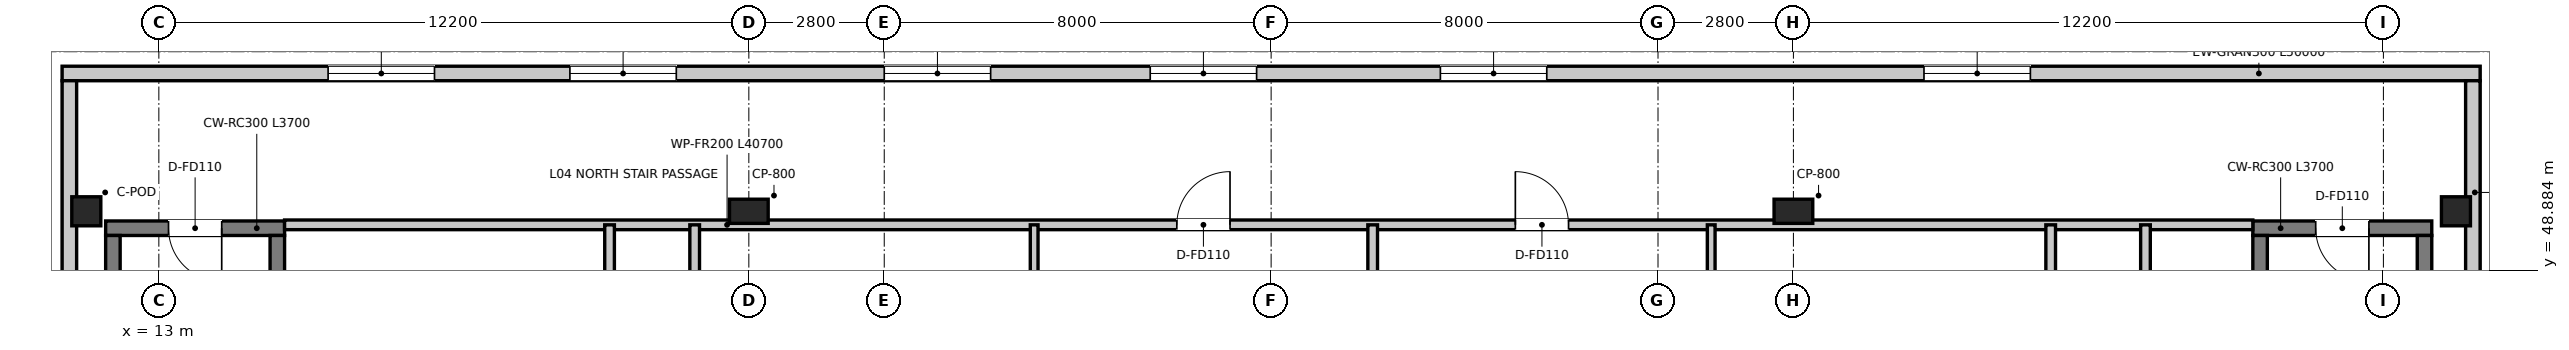
"""IFC4 building model, lengths in metres.
Left out: names, types, materials, properties, quantities, classifications, styles, units other than length and angle.
Written with IfcOpenShell. Run it as: python <this file> out.ifc"""

import sys

from ifc_helpers import new_model, si_unit, direction, frame, frame_2d, origin, origin_2d, place, context, subcontext, project, spatial, rectangle, extrude, source, transform, mapped, element, fill, save


model = new_model("IFC4")
c1 = context("Model", 3, precision=1e-05, world=origin(), true_north=direction((0.0, 1.0)))
c2 = subcontext(c1, "Body", "Model", "MODEL_VIEW")
j1 = project(units=[si_unit("LENGTHUNIT", "METRE"), si_unit("PLANEANGLEUNIT", "RADIAN")], contexts=[c1])
p1 = place(None, origin())
s1 = spatial("IfcSite", under=j1, at=p1, CompositionType="ELEMENT")
p2 = place(p1, origin())
s2 = spatial("IfcBuilding", under=s1, at=p2, CompositionType="ELEMENT")
p3 = place(p2, frame((0.0, 0.0, 20.0)))
s3 = spatial("IfcBuildingStorey", under=s2, at=p3, CompositionType="ELEMENT", Elevation=20.0)
p4 = place(p3, frame((15.6, 49.75, 0.0), z_axis=(0.0, 0.0, 1.0), x_axis=(-1.0, 0.0, 0.0)))
e1 = element("IfcWall", 1, at=p4, inside=s3, PredefinedType="SHEAR", context=c2, shape_type="SweptSolid", body=[
    extrude(rectangle(XDim=3.7, YDim=0.3, at=frame_2d((1.85, 0.0))), origin(), (0.0, 0.0, 1.0), 5.0),
])
p5 = place(p4, frame((1.3, 0.0, 0.0)))
e2 = element("IfcOpeningElement", 2, at=p5, cuts=e1, PredefinedType="OPENING", context=c2, shape_type="SweptSolid", body=[
    extrude(rectangle(XDim=1.1, YDim=2.15, at=frame_2d((0.55, 1.075))), frame((0.0, 0.16, 0.0), z_axis=(0.0, -1.0, 0.0), x_axis=(1.0, 0.0, 0.0)), (0.0, 0.0, 1.0), 0.32),
])
for number, where, z_axis, x_axis in (
    (3, (12.05, 42.12, 0.0), (0.0, 0.0, 1.0), (0.0, 1.0, 0.0)),
    (4, (15.45, 42.12, 0.0), (0.0, 0.0, 1.0), (0.0, 1.0, 0.0)),
):
    element("IfcWall", number, at=place(p3, frame(where, z_axis=z_axis, x_axis=x_axis)), inside=s3, PredefinedType="SHEAR", context=c2, shape_type="SweptSolid", body=[
        extrude(rectangle(XDim=7.48, YDim=0.3, at=frame_2d((3.74, 0.0))), origin(), (0.0, 0.0, 1.0), 5.0),
    ])
p6 = place(p3, frame((60.0, 49.75, 0.0), z_axis=(0.0, 0.0, 1.0), x_axis=(-1.0, 0.0, 0.0)))
e5 = element("IfcWall", 5, at=p6, inside=s3, PredefinedType="SHEAR", context=c2, shape_type="SweptSolid", body=[
    extrude(rectangle(XDim=3.7, YDim=0.3, at=frame_2d((1.85, 0.0))), origin(), (0.0, 0.0, 1.0), 5.0),
])
p7 = place(p6, frame((1.3, 0.0, 0.0)))
e6 = element("IfcOpeningElement", 6, at=p7, cuts=e5, PredefinedType="OPENING", context=c2, shape_type="SweptSolid", body=[
    extrude(rectangle(XDim=1.1, YDim=2.15, at=frame_2d((0.55, 1.075))), frame((0.0, 0.16, 0.0), z_axis=(0.0, -1.0, 0.0), x_axis=(1.0, 0.0, 0.0)), (0.0, 0.0, 1.0), 0.32),
])
for number, where, z_axis, x_axis in (
    (7, (56.45, 42.12, 0.0), (0.0, 0.0, 1.0), (0.0, 1.0, 0.0)),
    (8, (59.85, 42.12, 0.0), (0.0, 0.0, 1.0), (0.0, 1.0, 0.0)),
):
    element("IfcWall", number, at=place(p3, frame(where, z_axis=z_axis, x_axis=x_axis)), inside=s3, PredefinedType="SHEAR", context=c2, shape_type="SweptSolid", body=[
        extrude(rectangle(XDim=7.48, YDim=0.3, at=frame_2d((3.74, 0.0))), origin(), (0.0, 0.0, 1.0), 5.0),
    ])
m1 = source(origin(), c2, "Body", "SweptSolid", [
    extrude(rectangle(XDim=0.6, YDim=0.6, at=origin_2d()), origin(), (0.0, 0.0, 1.0), 5.0),
])
for number, where, z_axis, x_axis in (
    (9, (11.5, 50.1, 0.0), (0.0, 0.0, 1.0), (1.0, 0.0, 0.0)),
    (10, (60.5, 50.1, 0.0), (0.0, 0.0, 1.0), (1.0, 0.0, 0.0)),
):
    element("IfcColumn", number, at=place(p3, frame(where, z_axis=z_axis, x_axis=x_axis)), inside=s3, PredefinedType="COLUMN", context=c2, shape_type="MappedRepresentation", body=[
        mapped(m1, transform((0.0, 0.0, 0.0), x_axis=(1.0, 0.0, 0.0), y_axis=(0.0, 1.0, 0.0), z_axis=(0.0, 0.0, 1.0), scale=1.0)),
    ])
m2 = source(origin(), c2, "Body", "SweptSolid", [
    extrude(rectangle(XDim=0.8, YDim=0.5, at=origin_2d()), origin(), (0.0, 0.0, 1.0), 5.0),
])
for number, where, z_axis, x_axis in (
    (11, (25.2, 50.1, 0.0), (0.0, 0.0, 1.0), (1.0, 0.0, 0.0)),
    (12, (46.8, 50.1, 0.0), (0.0, 0.0, 1.0), (1.0, 0.0, 0.0)),
):
    element("IfcColumn", number, at=place(p3, frame(where, z_axis=z_axis, x_axis=x_axis)), inside=s3, PredefinedType="PILASTER", context=c2, shape_type="MappedRepresentation", body=[
        mapped(m2, transform((0.0, 0.0, 0.0), x_axis=(1.0, 0.0, 0.0), y_axis=(0.0, 1.0, 0.0), z_axis=(0.0, 0.0, 1.0), scale=1.0)),
    ])
p8 = place(p3, frame((11.0, 52.95, 0.0), z_axis=(0.0, 0.0, 1.0), x_axis=(1.0, 0.0, 0.0)))
e13 = element("IfcWall", 13, at=p8, inside=s3, PredefinedType="SOLIDWALL", context=c2, shape_type="SweptSolid", body=[
    extrude(rectangle(XDim=50.0, YDim=0.3, at=frame_2d((25.0, 0.0))), origin(), (0.0, 0.0, 1.0), 4.72),
])
p9 = place(p8, frame((5.5, 0.0, 1.2)))
e14 = element("IfcOpeningElement", 14, at=p9, cuts=e13, PredefinedType="OPENING", context=c2, shape_type="SweptSolid", body=[
    extrude(rectangle(XDim=2.2, YDim=1.8, at=frame_2d((1.1, 0.9))), frame((0.0, 0.16, 0.0), z_axis=(0.0, -1.0, 0.0), x_axis=(1.0, 0.0, 0.0)), (0.0, 0.0, 1.0), 0.32),
])
p10 = place(p8, frame((10.5, 0.0, 1.2)))
e15 = element("IfcOpeningElement", 15, at=p10, cuts=e13, PredefinedType="OPENING", context=c2, shape_type="SweptSolid", body=[
    extrude(rectangle(XDim=2.2, YDim=1.8, at=frame_2d((1.1, 0.9))), frame((0.0, 0.16, 0.0), z_axis=(0.0, -1.0, 0.0), x_axis=(1.0, 0.0, 0.0)), (0.0, 0.0, 1.0), 0.32),
])
p11 = place(p8, frame((17.0, 0.0, 1.2)))
e16 = element("IfcOpeningElement", 16, at=p11, cuts=e13, PredefinedType="OPENING", context=c2, shape_type="SweptSolid", body=[
    extrude(rectangle(XDim=2.2, YDim=1.8, at=frame_2d((1.1, 0.9))), frame((0.0, 0.16, 0.0), z_axis=(0.0, -1.0, 0.0), x_axis=(1.0, 0.0, 0.0)), (0.0, 0.0, 1.0), 0.32),
])
p12 = place(p8, frame((22.5, 0.0, 1.2)))
e17 = element("IfcOpeningElement", 17, at=p12, cuts=e13, PredefinedType="OPENING", context=c2, shape_type="SweptSolid", body=[
    extrude(rectangle(XDim=2.2, YDim=1.8, at=frame_2d((1.1, 0.9))), frame((0.0, 0.16, 0.0), z_axis=(0.0, -1.0, 0.0), x_axis=(1.0, 0.0, 0.0)), (0.0, 0.0, 1.0), 0.32),
])
p13 = place(p8, frame((28.5, 0.0, 1.2)))
e18 = element("IfcOpeningElement", 18, at=p13, cuts=e13, PredefinedType="OPENING", context=c2, shape_type="SweptSolid", body=[
    extrude(rectangle(XDim=2.2, YDim=1.8, at=frame_2d((1.1, 0.9))), frame((0.0, 0.16, 0.0), z_axis=(0.0, -1.0, 0.0), x_axis=(1.0, 0.0, 0.0)), (0.0, 0.0, 1.0), 0.32),
])
p14 = place(p8, frame((38.5, 0.0, 1.2)))
e19 = element("IfcOpeningElement", 19, at=p14, cuts=e13, PredefinedType="OPENING", context=c2, shape_type="SweptSolid", body=[
    extrude(rectangle(XDim=2.2, YDim=1.8, at=frame_2d((1.1, 0.9))), frame((0.0, 0.16, 0.0), z_axis=(0.0, -1.0, 0.0), x_axis=(1.0, 0.0, 0.0)), (0.0, 0.0, 1.0), 0.32),
])
p15 = place(p3, frame((11.15, 0.6, 0.0), z_axis=(0.0, 0.0, 1.0), x_axis=(0.0, 1.0, 0.0)))
e20 = element("IfcWall", 20, at=p15, inside=s3, PredefinedType="SOLIDWALL", context=c2, shape_type="SweptSolid", body=[
    extrude(rectangle(XDim=52.2, YDim=0.3, at=frame_2d((26.1, 0.0))), origin(), (0.0, 0.0, 1.0), 2.3),
])
p16 = place(p3, frame((60.85, 52.8, 0.0), z_axis=(0.0, 0.0, 1.0), x_axis=(0.0, -1.0, 0.0)))
e21 = element("IfcWall", 21, at=p16, inside=s3, PredefinedType="SOLIDWALL", context=c2, shape_type="SweptSolid", body=[
    extrude(rectangle(XDim=52.2, YDim=0.3, at=frame_2d((26.1, 0.0))), origin(), (0.0, 0.0, 1.0), 4.72),
])
p17 = place(p3, frame((15.6, 49.82, 0.0), z_axis=(0.0, 0.0, 1.0), x_axis=(1.0, 0.0, 0.0)))
e22 = element("IfcWall", 22, at=p17, inside=s3, PredefinedType="PARTITIONING", context=c2, shape_type="SweptSolid", body=[
    extrude(rectangle(XDim=40.7, YDim=0.2, at=frame_2d((20.35, 0.0))), origin(), (0.0, 0.0, 1.0), 4.03),
])
p18 = place(p17, frame((18.45, 0.0, 0.0)))
e23 = element("IfcOpeningElement", 23, at=p18, cuts=e22, PredefinedType="OPENING", context=c2, shape_type="SweptSolid", body=[
    extrude(rectangle(XDim=1.1, YDim=2.15, at=frame_2d((0.55, 1.075))), frame((0.0, 0.11, 0.0), z_axis=(0.0, -1.0, 0.0), x_axis=(1.0, 0.0, 0.0)), (0.0, 0.0, 1.0), 0.22),
])
p19 = place(p17, frame((25.45, 0.0, 0.0)))
e24 = element("IfcOpeningElement", 24, at=p19, cuts=e22, PredefinedType="OPENING", context=c2, shape_type="SweptSolid", body=[
    extrude(rectangle(XDim=1.1, YDim=2.15, at=frame_2d((0.55, 1.075))), frame((0.0, 0.11, 0.0), z_axis=(0.0, -1.0, 0.0), x_axis=(1.0, 0.0, 0.0)), (0.0, 0.0, 1.0), 0.22),
])
p20 = place(p3, frame((22.32, 29.1, 0.0), z_axis=(0.0, 0.0, 1.0), x_axis=(0.0, 1.0, 0.0)))
e25 = element("IfcWall", 25, at=p20, inside=s3, PredefinedType="PARTITIONING", context=c2, shape_type="SweptSolid", body=[
    extrude(rectangle(XDim=20.72, YDim=0.2, at=frame_2d((10.36, 0.0))), origin(), (0.0, 0.0, 1.0), 4.02),
])
p21 = place(p20, frame((3.35, 0.0, 0.0)))
e26 = element("IfcOpeningElement", 26, at=p21, cuts=e25, PredefinedType="OPENING", context=c2, shape_type="SweptSolid", body=[
    extrude(rectangle(XDim=1.1, YDim=2.15, at=frame_2d((0.55, 1.075))), frame((0.0, 0.11, 0.0), z_axis=(0.0, -1.0, 0.0), x_axis=(1.0, 0.0, 0.0)), (0.0, 0.0, 1.0), 0.22),
])
p22 = place(p20, frame((10.475, 0.0, 0.0)))
e27 = element("IfcOpeningElement", 27, at=p22, cuts=e25, PredefinedType="OPENING", context=c2, shape_type="SweptSolid", body=[
    extrude(rectangle(XDim=1.05, YDim=2.1, at=frame_2d((0.525, 1.05))), frame((0.0, 0.11, 0.0), z_axis=(0.0, -1.0, 0.0), x_axis=(1.0, 0.0, 0.0)), (0.0, 0.0, 1.0), 0.22),
])
p23 = place(p3, frame((24.08, 29.1, 0.0), z_axis=(0.0, 0.0, 1.0), x_axis=(0.0, 1.0, 0.0)))
e28 = element("IfcWall", 28, at=p23, inside=s3, PredefinedType="PARTITIONING", context=c2, shape_type="SweptSolid", body=[
    extrude(rectangle(XDim=20.72, YDim=0.2, at=frame_2d((10.36, 0.0))), origin(), (0.0, 0.0, 1.0), 4.02),
])
p24 = place(p23, frame((4.35, 0.0, 0.0)))
e29 = element("IfcOpeningElement", 29, at=p24, cuts=e28, PredefinedType="OPENING", context=c2, shape_type="SweptSolid", body=[
    extrude(rectangle(XDim=1.1, YDim=2.15, at=frame_2d((0.55, 1.075))), frame((0.0, 0.11, 0.0), z_axis=(0.0, -1.0, 0.0), x_axis=(1.0, 0.0, 0.0)), (0.0, 0.0, 1.0), 0.22),
])
p25 = place(p23, frame((14.85, 0.0, 0.0)))
e30 = element("IfcOpeningElement", 30, at=p25, cuts=e28, PredefinedType="OPENING", context=c2, shape_type="SweptSolid", body=[
    extrude(rectangle(XDim=1.1, YDim=2.15, at=frame_2d((0.55, 1.075))), frame((0.0, 0.11, 0.0), z_axis=(0.0, -1.0, 0.0), x_axis=(1.0, 0.0, 0.0)), (0.0, 0.0, 1.0), 0.22),
])
p26 = place(p3, frame((52.12, 29.1, 0.0), z_axis=(0.0, 0.0, 1.0), x_axis=(0.0, 1.0, 0.0)))
e31 = element("IfcWall", 31, at=p26, inside=s3, PredefinedType="PARTITIONING", context=c2, shape_type="SweptSolid", body=[
    extrude(rectangle(XDim=20.72, YDim=0.2, at=frame_2d((10.36, 0.0))), origin(), (0.0, 0.0, 1.0), 4.08),
])
p27 = place(p26, frame((4.35, 0.0, 0.0)))
e32 = element("IfcOpeningElement", 32, at=p27, cuts=e31, PredefinedType="OPENING", context=c2, shape_type="SweptSolid", body=[
    extrude(rectangle(XDim=1.1, YDim=2.15, at=frame_2d((0.55, 1.075))), frame((0.0, 0.11, 0.0), z_axis=(0.0, -1.0, 0.0), x_axis=(1.0, 0.0, 0.0)), (0.0, 0.0, 1.0), 0.22),
])
p28 = place(p26, frame((14.85, 0.0, 0.0)))
e33 = element("IfcOpeningElement", 33, at=p28, cuts=e31, PredefinedType="OPENING", context=c2, shape_type="SweptSolid", body=[
    extrude(rectangle(XDim=1.1, YDim=2.15, at=frame_2d((0.55, 1.075))), frame((0.0, 0.11, 0.0), z_axis=(0.0, -1.0, 0.0), x_axis=(1.0, 0.0, 0.0)), (0.0, 0.0, 1.0), 0.22),
])
p29 = place(p3, frame((54.08, 0.605, 0.0), z_axis=(0.0, 0.0, 1.0), x_axis=(0.0, 1.0, 0.0)))
e34 = element("IfcWall", 34, at=p29, inside=s3, PredefinedType="PARTITIONING", context=c2, shape_type="SweptSolid", body=[
    extrude(rectangle(XDim=49.215, YDim=0.2, at=frame_2d((24.607, 0.0))), origin(), (0.0, 0.0, 1.0), 4.08),
])
p30 = place(p29, frame((32.795, 0.0, 0.0)))
e35 = element("IfcOpeningElement", 35, at=p30, cuts=e34, PredefinedType="OPENING", context=c2, shape_type="SweptSolid", body=[
    extrude(rectangle(XDim=1.2, YDim=2.15, at=frame_2d((0.6, 1.075))), frame((0.0, 0.11, 0.0), z_axis=(0.0, -1.0, 0.0), x_axis=(1.0, 0.0, 0.0)), (0.0, 0.0, 1.0), 0.22),
])
p31 = place(p3, frame((31.1, 29.1, 0.0), z_axis=(0.0, 0.0, 1.0), x_axis=(0.0, 1.0, 0.0)))
e36 = element("IfcWall", 36, at=p31, inside=s3, PredefinedType="PARTITIONING", context=c2, shape_type="SweptSolid", body=[
    extrude(rectangle(XDim=20.72, YDim=0.16, at=frame_2d((10.36, 0.0))), origin(), (0.0, 0.0, 1.0), 3.92),
])
p32 = place(p3, frame((38.1, 29.1, 0.0), z_axis=(0.0, 0.0, 1.0), x_axis=(0.0, 1.0, 0.0)))
e37 = element("IfcWall", 37, at=p32, inside=s3, PredefinedType="PARTITIONING", context=c2, shape_type="SweptSolid", body=[
    extrude(rectangle(XDim=20.72, YDim=0.2, at=frame_2d((10.36, 0.0))), origin(), (0.0, 0.0, 1.0), 3.92),
])
p33 = place(p3, frame((45.1, 29.1, 0.0), z_axis=(0.0, 0.0, 1.0), x_axis=(0.0, 1.0, 0.0)))
e38 = element("IfcWall", 38, at=p33, inside=s3, PredefinedType="PARTITIONING", context=c2, shape_type="SweptSolid", body=[
    extrude(rectangle(XDim=20.72, YDim=0.16, at=frame_2d((10.36, 0.0))), origin(), (0.0, 0.0, 1.0), 3.92),
])
p34 = place(p9, origin())
e39 = element("IfcWindow", 39, at=p34, inside=s3, PartitioningType="SINGLE_PANEL", PredefinedType="WINDOW", context=c2, shape_type="SweptSolid", body=[
    extrude(rectangle(XDim=2.2, YDim=1.8, at=frame_2d((1.1, 0.9))), frame((0.0, 0.03, 0.0), z_axis=(0.0, -1.0, 0.0), x_axis=(1.0, 0.0, 0.0)), (0.0, 0.0, 1.0), 0.06),
])
fill(e14, e39)
p35 = place(p10, origin())
e40 = element("IfcWindow", 40, at=p35, inside=s3, PartitioningType="SINGLE_PANEL", PredefinedType="WINDOW", context=c2, shape_type="SweptSolid", body=[
    extrude(rectangle(XDim=2.2, YDim=1.8, at=frame_2d((1.1, 0.9))), frame((0.0, 0.03, 0.0), z_axis=(0.0, -1.0, 0.0), x_axis=(1.0, 0.0, 0.0)), (0.0, 0.0, 1.0), 0.06),
])
fill(e15, e40)
p36 = place(p11, origin())
e41 = element("IfcWindow", 41, at=p36, inside=s3, PartitioningType="SINGLE_PANEL", PredefinedType="WINDOW", context=c2, shape_type="SweptSolid", body=[
    extrude(rectangle(XDim=2.2, YDim=1.8, at=frame_2d((1.1, 0.9))), frame((0.0, 0.03, 0.0), z_axis=(0.0, -1.0, 0.0), x_axis=(1.0, 0.0, 0.0)), (0.0, 0.0, 1.0), 0.06),
])
fill(e16, e41)
p37 = place(p12, origin())
e42 = element("IfcWindow", 42, at=p37, inside=s3, PartitioningType="SINGLE_PANEL", PredefinedType="WINDOW", context=c2, shape_type="SweptSolid", body=[
    extrude(rectangle(XDim=2.2, YDim=1.8, at=frame_2d((1.1, 0.9))), frame((0.0, 0.03, 0.0), z_axis=(0.0, -1.0, 0.0), x_axis=(1.0, 0.0, 0.0)), (0.0, 0.0, 1.0), 0.06),
])
fill(e17, e42)
p38 = place(p13, origin())
e43 = element("IfcWindow", 43, at=p38, inside=s3, PartitioningType="SINGLE_PANEL", PredefinedType="WINDOW", context=c2, shape_type="SweptSolid", body=[
    extrude(rectangle(XDim=2.2, YDim=1.8, at=frame_2d((1.1, 0.9))), frame((0.0, 0.03, 0.0), z_axis=(0.0, -1.0, 0.0), x_axis=(1.0, 0.0, 0.0)), (0.0, 0.0, 1.0), 0.06),
])
fill(e18, e43)
p39 = place(p14, origin())
e44 = element("IfcWindow", 44, at=p39, inside=s3, PartitioningType="SINGLE_PANEL", PredefinedType="WINDOW", context=c2, shape_type="SweptSolid", body=[
    extrude(rectangle(XDim=2.2, YDim=1.8, at=frame_2d((1.1, 0.9))), frame((0.0, 0.03, 0.0), z_axis=(0.0, -1.0, 0.0), x_axis=(1.0, 0.0, 0.0)), (0.0, 0.0, 1.0), 0.06),
])
fill(e19, e44)
p40 = place(p5, origin())
e45 = element("IfcDoor", 45, at=p40, inside=s3, OperationType="SINGLE_SWING_LEFT", PredefinedType="DOOR", context=c2, shape_type="SweptSolid", body=[
    extrude(rectangle(XDim=1.1, YDim=2.15, at=frame_2d((0.55, 1.075))), frame((0.0, 0.025, 0.0), z_axis=(0.0, -1.0, 0.0), x_axis=(1.0, 0.0, 0.0)), (0.0, 0.0, 1.0), 0.05),
])
fill(e2, e45)
p41 = place(p7, origin())
e46 = element("IfcDoor", 46, at=p41, inside=s3, OperationType="SINGLE_SWING_LEFT", PredefinedType="DOOR", context=c2, shape_type="SweptSolid", body=[
    extrude(rectangle(XDim=1.1, YDim=2.15, at=frame_2d((0.55, 1.075))), frame((0.0, 0.025, 0.0), z_axis=(0.0, -1.0, 0.0), x_axis=(1.0, 0.0, 0.0)), (0.0, 0.0, 1.0), 0.05),
])
fill(e6, e46)
p42 = place(p18, origin())
e47 = element("IfcDoor", 47, at=p42, inside=s3, OperationType="SINGLE_SWING_RIGHT", PredefinedType="DOOR", context=c2, shape_type="SweptSolid", body=[
    extrude(rectangle(XDim=1.1, YDim=2.15, at=frame_2d((0.55, 1.075))), frame((0.0, 0.025, 0.0), z_axis=(0.0, -1.0, 0.0), x_axis=(1.0, 0.0, 0.0)), (0.0, 0.0, 1.0), 0.05),
])
fill(e23, e47)
p43 = place(p19, origin())
e48 = element("IfcDoor", 48, at=p43, inside=s3, OperationType="SINGLE_SWING_LEFT", PredefinedType="DOOR", context=c2, shape_type="SweptSolid", body=[
    extrude(rectangle(XDim=1.1, YDim=2.15, at=frame_2d((0.55, 1.075))), frame((0.0, 0.025, 0.0), z_axis=(0.0, -1.0, 0.0), x_axis=(1.0, 0.0, 0.0)), (0.0, 0.0, 1.0), 0.05),
])
fill(e24, e48)
save(model, sys.argv[1])
